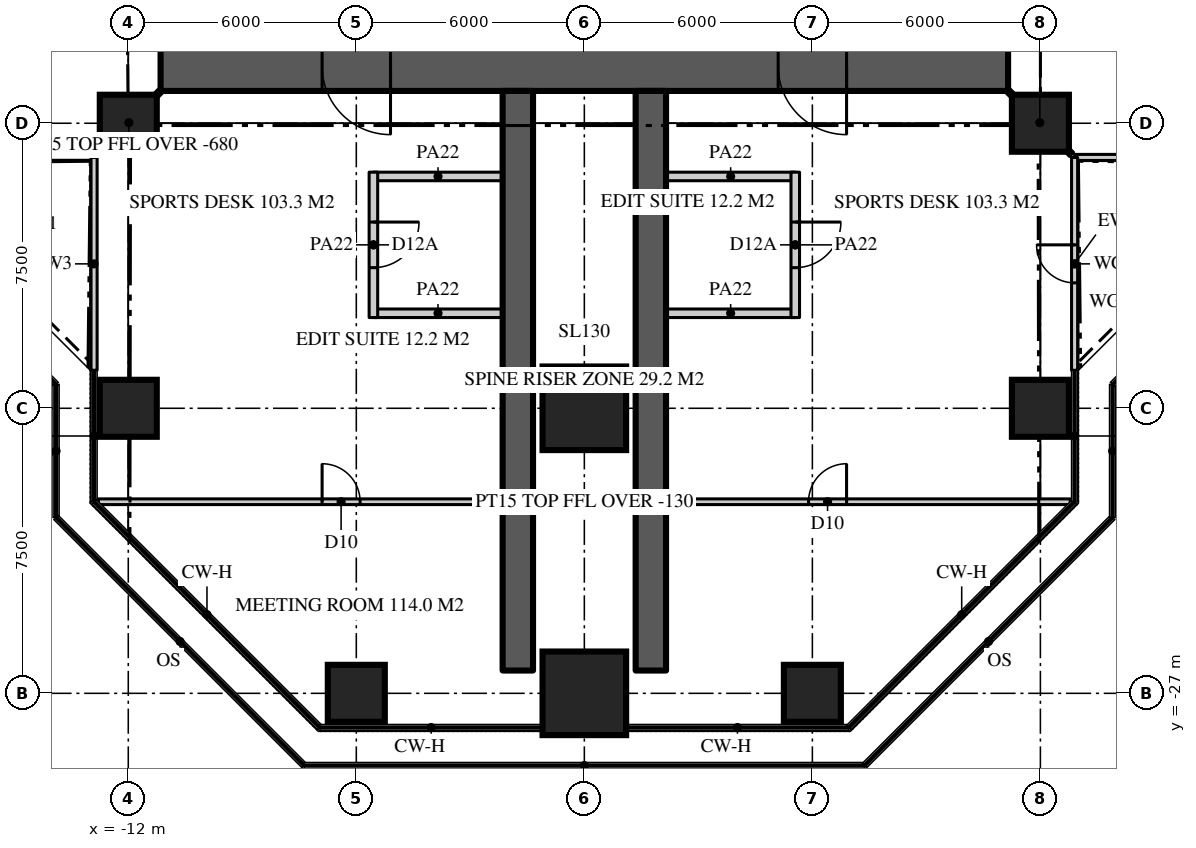
"""IFC4 building model, lengths in metres.
Left out: names, types, materials, properties, quantities, classifications, styles, units other than length and angle.
Written with IfcOpenShell. Run it as: python <this file> out.ifc"""

import sys

from ifc_helpers import new_model, si_unit, direction, frame, frame_2d, origin, origin_2d, place, context, subcontext, project, spatial, rectangle, extrude, element, fill, save


model = new_model("IFC4")
c1 = context("Model", 3, precision=1e-05, world=origin(), true_north=direction((0.0, 1.0)))
c2 = subcontext(c1, "Body", "Model", "MODEL_VIEW")
j1 = project(units=[si_unit("LENGTHUNIT", "METRE"), si_unit("PLANEANGLEUNIT", "RADIAN")], contexts=[c1])
p1 = place(None, origin())
s1 = spatial("IfcSite", under=j1, at=p1, CompositionType="ELEMENT")
p2 = place(p1, origin())
s2 = spatial("IfcBuilding", under=s1, at=p2, CompositionType="ELEMENT")
p3 = place(p2, frame((0.0, 0.0, 224.4)))
s3 = spatial("IfcBuildingStorey", under=s2, at=p3, CompositionType="ELEMENT", Elevation=224.4)
p4 = place(p3, frame((11.15, -10.5, 0.0), z_axis=(0.0, 0.0, 1.0), x_axis=(-1.0, 0.0, 0.0)))
e1 = element("IfcWall", 1, at=p4, inside=s3, PredefinedType="SHEAR", context=c2, shape_type="SweptSolid", body=[
    extrude(rectangle(XDim=22.3, YDim=1.3, at=frame_2d((11.15, 0.0))), origin(), (0.0, 0.0, 1.0), 3.9),
])
p5 = place(p4, frame((16.25, 0.0, 0.0)))
e2 = element("IfcOpeningElement", 2, at=p5, cuts=e1, PredefinedType="OPENING", context=c2, shape_type="SweptSolid", body=[
    extrude(rectangle(XDim=1.8, YDim=2.2, at=frame_2d((0.9, 1.1))), frame((0.0, 0.66, 0.0), z_axis=(0.0, -1.0, 0.0), x_axis=(1.0, 0.0, 0.0)), (0.0, 0.0, 1.0), 1.32),
])
p6 = place(p4, frame((4.25, 0.0, 0.0)))
e3 = element("IfcOpeningElement", 3, at=p6, cuts=e1, PredefinedType="OPENING", context=c2, shape_type="SweptSolid", body=[
    extrude(rectangle(XDim=1.8, YDim=2.2, at=frame_2d((0.9, 1.1))), frame((0.0, 0.66, 0.0), z_axis=(0.0, -1.0, 0.0), x_axis=(1.0, 0.0, 0.0)), (0.0, 0.0, 1.0), 1.32),
])
for number, where, z_axis, x_axis in (
    (4, (-1.75, -11.15, 0.0), (0.0, 0.0, 1.0), (0.0, -1.0, 0.0)),
    (5, (1.75, -11.15, 0.0), (0.0, 0.0, 1.0), (0.0, -1.0, 0.0)),
):
    element("IfcWall", number, at=place(p3, frame(where, z_axis=z_axis, x_axis=x_axis)), inside=s3, PredefinedType="SHEAR", context=c2, shape_type="SweptSolid", body=[
        extrude(rectangle(XDim=15.25, YDim=0.8, at=frame_2d((7.625, 0.0))), origin(), (0.0, 0.0, 1.0), 3.9),
    ])
p7 = place(p3, frame((-6.0, -27.0, 0.0), z_axis=(0.0, 0.0, 1.0), x_axis=(1.0, 0.0, 0.0)))
e6 = element("IfcColumn", 6, at=p7, inside=s3, PredefinedType="COLUMN", context=c2, shape_type="SweptSolid", body=[
    extrude(rectangle(XDim=1.5, YDim=1.5, at=origin_2d()), origin(), (0.0, 0.0, 1.0), 3.9),
])
p8 = place(p3, frame((0.0, -27.0, 0.0), z_axis=(0.0, 0.0, 1.0), x_axis=(1.0, 0.0, 0.0)))
e7 = element("IfcColumn", 7, at=p8, inside=s3, PredefinedType="COLUMN", context=c2, shape_type="SweptSolid", body=[
    extrude(rectangle(XDim=2.2, YDim=2.2, at=origin_2d()), origin(), (0.0, 0.0, 1.0), 3.9),
])
for number, where, z_axis, x_axis in (
    (8, (6.0, -27.0, 0.0), (0.0, 0.0, 1.0), (1.0, 0.0, 0.0)),
    (9, (-12.0, -19.5, 0.0), (0.0, 0.0, 1.0), (1.0, 0.0, 0.0)),
):
    element("IfcColumn", number, at=place(p3, frame(where, z_axis=z_axis, x_axis=x_axis)), inside=s3, PredefinedType="COLUMN", context=c2, shape_type="SweptSolid", body=[
        extrude(rectangle(XDim=1.5, YDim=1.5, at=origin_2d()), origin(), (0.0, 0.0, 1.0), 3.9),
    ])
p9 = place(p3, frame((0.0, -19.5, 0.0), z_axis=(0.0, 0.0, 1.0), x_axis=(1.0, 0.0, 0.0)))
e10 = element("IfcColumn", 10, at=p9, inside=s3, PredefinedType="COLUMN", context=c2, shape_type="SweptSolid", body=[
    extrude(rectangle(XDim=2.2, YDim=2.2, at=origin_2d()), origin(), (0.0, 0.0, 1.0), 3.9),
])
for number, where, z_axis, x_axis in (
    (11, (12.0, -19.5, 0.0), (0.0, 0.0, 1.0), (1.0, 0.0, 0.0)),
    (12, (-12.0, -12.0, 0.0), (0.0, 0.0, 1.0), (1.0, 0.0, 0.0)),
    (13, (12.0, -12.0, 0.0), (0.0, 0.0, 1.0), (1.0, 0.0, 0.0)),
):
    element("IfcColumn", number, at=place(p3, frame(where, z_axis=z_axis, x_axis=x_axis)), inside=s3, PredefinedType="COLUMN", context=c2, shape_type="SweptSolid", body=[
        extrude(rectangle(XDim=1.5, YDim=1.5, at=origin_2d()), origin(), (0.0, 0.0, 1.0), 3.9),
    ])
p10 = place(p3, frame((12.9, -12.9, 0.0), z_axis=(0.0, 0.0, 1.0), x_axis=(1.0, 0.0, 0.0)))
e14 = element("IfcWall", 14, at=p10, inside=s3, PredefinedType="SOLIDWALL", context=c2, shape_type="SweptSolid", body=[
    extrude(rectangle(XDim=5.6, YDim=0.16, at=frame_2d((2.8, 0.0))), origin(), (0.0, 0.0, 1.0), 3.77),
])
p11 = place(p3, frame((-18.5, -12.9, 0.0), z_axis=(0.0, 0.0, 1.0), x_axis=(1.0, 0.0, 0.0)))
e15 = element("IfcWall", 15, at=p11, inside=s3, PredefinedType="SOLIDWALL", context=c2, shape_type="SweptSolid", body=[
    extrude(rectangle(XDim=5.6, YDim=0.16, at=frame_2d((2.8, 0.0))), origin(), (0.0, 0.0, 1.0), 3.77),
])
p12 = place(p11, frame((2.3, 0.0, 0.0)))
e16 = element("IfcOpeningElement", 16, at=p12, cuts=e15, PredefinedType="OPENING", context=c2, shape_type="SweptSolid", body=[
    extrude(rectangle(XDim=1.0, YDim=2.2, at=frame_2d((0.5, 1.1))), frame((0.0, 0.09, 0.0), z_axis=(0.0, -1.0, 0.0), x_axis=(1.0, 0.0, 0.0)), (0.0, 0.0, 1.0), 0.18),
])
p13 = place(p3, frame((-12.9, -12.9, 0.0), z_axis=(0.0, 0.0, 1.0), x_axis=(0.0, -1.0, 0.0)))
e17 = element("IfcWall", 17, at=p13, inside=s3, PredefinedType="SOLIDWALL", context=c2, shape_type="SweptSolid", body=[
    extrude(rectangle(XDim=5.6, YDim=0.16, at=frame_2d((2.8, 0.0))), origin(), (0.0, 0.0, 1.0), 3.77),
])
p14 = place(p3, frame((12.9, -18.5, 0.0), z_axis=(0.0, 0.0, 1.0), x_axis=(0.0, 1.0, 0.0)))
e18 = element("IfcWall", 18, at=p14, inside=s3, PredefinedType="SOLIDWALL", context=c2, shape_type="SweptSolid", body=[
    extrude(rectangle(XDim=5.6, YDim=0.16, at=frame_2d((2.8, 0.0))), origin(), (0.0, 0.0, 1.0), 3.77),
])
p15 = place(p14, frame((2.3, 0.0, 0.0)))
e19 = element("IfcOpeningElement", 19, at=p15, cuts=e18, PredefinedType="OPENING", context=c2, shape_type="SweptSolid", body=[
    extrude(rectangle(XDim=1.0, YDim=2.2, at=frame_2d((0.5, 1.1))), frame((0.0, 0.09, 0.0), z_axis=(0.0, -1.0, 0.0), x_axis=(1.0, 0.0, 0.0)), (0.0, 0.0, 1.0), 0.18),
])
p16 = place(p3, frame((-12.786, -21.959, 0.0), z_axis=(0.0, 0.0, 1.0), x_axis=(1.0, 0.0, 0.0)))
e20 = element("IfcWall", 20, at=p16, inside=s3, PredefinedType="PARTITIONING", context=c2, shape_type="SweptSolid", body=[
    extrude(rectangle(XDim=25.573, YDim=0.15, at=frame_2d((12.786, 0.0))), origin(), (0.0, 0.0, 1.0), 3.77),
])
p17 = place(p16, frame((18.687, 0.0, 0.0)))
e21 = element("IfcOpeningElement", 21, at=p17, cuts=e20, PredefinedType="OPENING", context=c2, shape_type="SweptSolid", body=[
    extrude(rectangle(XDim=1.0, YDim=2.2, at=frame_2d((0.5, 1.1))), frame((0.0, 0.085, 0.0), z_axis=(0.0, -1.0, 0.0), x_axis=(1.0, 0.0, 0.0)), (0.0, 0.0, 1.0), 0.17),
])
p18 = place(p16, frame((5.886, 0.0, 0.0)))
e22 = element("IfcOpeningElement", 22, at=p18, cuts=e20, PredefinedType="OPENING", context=c2, shape_type="SweptSolid", body=[
    extrude(rectangle(XDim=1.0, YDim=2.2, at=frame_2d((0.5, 1.1))), frame((0.0, 0.085, 0.0), z_axis=(0.0, -1.0, 0.0), x_axis=(1.0, 0.0, 0.0)), (0.0, 0.0, 1.0), 0.17),
])
for number, where, z_axis, x_axis in (
    (23, (2.15, -13.4, 0.0), (0.0, 0.0, 1.0), (1.0, 0.0, 0.0)),
    (24, (2.15, -17.0, 0.0), (0.0, 0.0, 1.0), (1.0, 0.0, 0.0)),
):
    element("IfcWall", number, at=place(p3, frame(where, z_axis=z_axis, x_axis=x_axis)), inside=s3, PredefinedType="PARTITIONING", context=c2, shape_type="SweptSolid", body=[
        extrude(rectangle(XDim=3.4, YDim=0.225, at=frame_2d((1.7, 0.0))), origin(), (0.0, 0.0, 1.0), 3.77),
    ])
p19 = place(p3, frame((5.55, -13.288, 0.0), z_axis=(0.0, 0.0, 1.0), x_axis=(0.0, -1.0, 0.0)))
e25 = element("IfcWall", 25, at=p19, inside=s3, PredefinedType="PARTITIONING", context=c2, shape_type="SweptSolid", body=[
    extrude(rectangle(XDim=3.825, YDim=0.225, at=frame_2d((1.913, 0.0))), origin(), (0.0, 0.0, 1.0), 3.77),
])
p20 = place(p19, frame((1.312, 0.0, 0.0)))
e26 = element("IfcOpeningElement", 26, at=p20, cuts=e25, PredefinedType="OPENING", context=c2, shape_type="SweptSolid", body=[
    extrude(rectangle(XDim=1.2, YDim=2.2, at=frame_2d((0.6, 1.1))), frame((0.0, 0.123, 0.0), z_axis=(0.0, -1.0, 0.0), x_axis=(1.0, 0.0, 0.0)), (0.0, 0.0, 1.0), 0.245),
])
for number, where, z_axis, x_axis in (
    (27, (-2.15, -13.4, 0.0), (0.0, 0.0, 1.0), (-1.0, 0.0, 0.0)),
    (28, (-2.15, -17.0, 0.0), (0.0, 0.0, 1.0), (-1.0, 0.0, 0.0)),
):
    element("IfcWall", number, at=place(p3, frame(where, z_axis=z_axis, x_axis=x_axis)), inside=s3, PredefinedType="PARTITIONING", context=c2, shape_type="SweptSolid", body=[
        extrude(rectangle(XDim=3.4, YDim=0.225, at=frame_2d((1.7, 0.0))), origin(), (0.0, 0.0, 1.0), 3.77),
    ])
p21 = place(p3, frame((-5.55, -13.288, 0.0), z_axis=(0.0, 0.0, 1.0), x_axis=(0.0, -1.0, 0.0)))
e29 = element("IfcWall", 29, at=p21, inside=s3, PredefinedType="PARTITIONING", context=c2, shape_type="SweptSolid", body=[
    extrude(rectangle(XDim=3.825, YDim=0.225, at=frame_2d((1.913, 0.0))), origin(), (0.0, 0.0, 1.0), 3.77),
])
p22 = place(p21, frame((1.312, 0.0, 0.0)))
e30 = element("IfcOpeningElement", 30, at=p22, cuts=e29, PredefinedType="OPENING", context=c2, shape_type="SweptSolid", body=[
    extrude(rectangle(XDim=1.2, YDim=2.2, at=frame_2d((0.6, 1.1))), frame((0.0, 0.123, 0.0), z_axis=(0.0, -1.0, 0.0), x_axis=(1.0, 0.0, 0.0)), (0.0, 0.0, 1.0), 0.245),
])
for number, where, z_axis, x_axis in (
    (31, (-11.15, -11.15, 0.0), (0.0, 0.0, 1.0), (-0.707, -0.707, 0.0)),
    (32, (11.15, -11.15, 0.0), (0.0, 0.0, 1.0), (0.707, -0.707, 0.0)),
):
    element("IfcWall", number, at=place(p3, frame(where, z_axis=z_axis, x_axis=x_axis)), inside=s3, PredefinedType="PARTITIONING", context=c2, shape_type="SweptSolid", body=[
        extrude(rectangle(XDim=2.362, YDim=0.15, at=frame_2d((1.181, 0.0))), origin(), (0.0, 0.0, 1.0), 3.22),
    ])
p23 = place(p15, origin())
e33 = element("IfcDoor", 33, at=p23, inside=s3, OperationType="SINGLE_SWING_RIGHT", PredefinedType="DOOR", context=c2, shape_type="SweptSolid", body=[
    extrude(rectangle(XDim=1.0, YDim=2.2, at=frame_2d((0.5, 1.1))), frame((0.0, 0.025, 0.0), z_axis=(0.0, -1.0, 0.0), x_axis=(1.0, 0.0, 0.0)), (0.0, 0.0, 1.0), 0.05),
])
fill(e19, e33)
p24 = place(p5, origin())
e34 = element("IfcDoor", 34, at=p24, inside=s3, OperationType="DOUBLE_DOOR_DOUBLE_SWING", PredefinedType="DOOR", context=c2, shape_type="SweptSolid", body=[
    extrude(rectangle(XDim=1.8, YDim=2.2, at=frame_2d((0.9, 1.1))), frame((0.0, 0.025, 0.0), z_axis=(0.0, -1.0, 0.0), x_axis=(1.0, 0.0, 0.0)), (0.0, 0.0, 1.0), 0.05),
])
fill(e2, e34)
p25 = place(p6, origin())
e35 = element("IfcDoor", 35, at=p25, inside=s3, OperationType="DOUBLE_DOOR_DOUBLE_SWING", PredefinedType="DOOR", context=c2, shape_type="SweptSolid", body=[
    extrude(rectangle(XDim=1.8, YDim=2.2, at=frame_2d((0.9, 1.1))), frame((0.0, 0.025, 0.0), z_axis=(0.0, -1.0, 0.0), x_axis=(1.0, 0.0, 0.0)), (0.0, 0.0, 1.0), 0.05),
])
fill(e3, e35)
p26 = place(p17, origin())
e36 = element("IfcDoor", 36, at=p26, inside=s3, OperationType="SINGLE_SWING_RIGHT", PredefinedType="DOOR", context=c2, shape_type="SweptSolid", body=[
    extrude(rectangle(XDim=1.0, YDim=2.2, at=frame_2d((0.5, 1.1))), frame((0.0, 0.025, 0.0), z_axis=(0.0, -1.0, 0.0), x_axis=(1.0, 0.0, 0.0)), (0.0, 0.0, 1.0), 0.05),
])
fill(e21, e36)
p27 = place(p18, origin())
e37 = element("IfcDoor", 37, at=p27, inside=s3, OperationType="SINGLE_SWING_LEFT", PredefinedType="DOOR", context=c2, shape_type="SweptSolid", body=[
    extrude(rectangle(XDim=1.0, YDim=2.2, at=frame_2d((0.5, 1.1))), frame((0.0, 0.025, 0.0), z_axis=(0.0, -1.0, 0.0), x_axis=(1.0, 0.0, 0.0)), (0.0, 0.0, 1.0), 0.05),
])
fill(e22, e37)
p28 = place(p20, origin())
e38 = element("IfcDoor", 38, at=p28, inside=s3, OperationType="SINGLE_SWING_LEFT", PredefinedType="DOOR", context=c2, shape_type="SweptSolid", body=[
    extrude(rectangle(XDim=1.2, YDim=2.2, at=frame_2d((0.6, 1.1))), frame((0.0, 0.025, 0.0), z_axis=(0.0, -1.0, 0.0), x_axis=(1.0, 0.0, 0.0)), (0.0, 0.0, 1.0), 0.05),
])
fill(e26, e38)
p29 = place(p22, origin())
e39 = element("IfcDoor", 39, at=p29, inside=s3, OperationType="SINGLE_SWING_LEFT", PredefinedType="DOOR", context=c2, shape_type="SweptSolid", body=[
    extrude(rectangle(XDim=1.2, YDim=2.2, at=frame_2d((0.6, 1.1))), frame((0.0, 0.025, 0.0), z_axis=(0.0, -1.0, 0.0), x_axis=(1.0, 0.0, 0.0)), (0.0, 0.0, 1.0), 0.05),
])
fill(e30, e39)
save(model, sys.argv[1])
